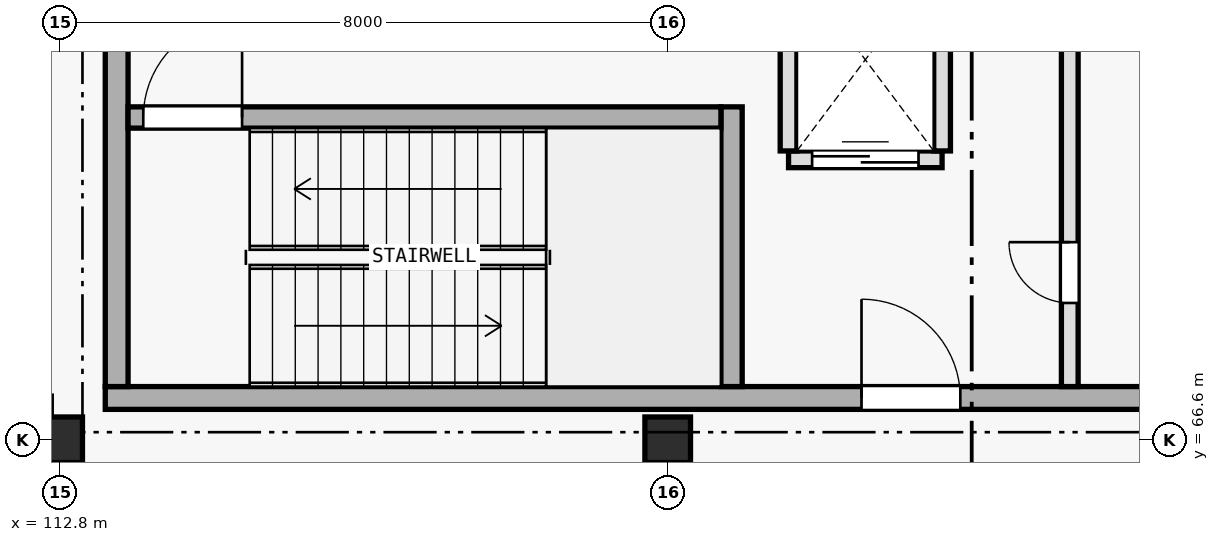
"""IFC4 building model, lengths in metres.
Left out: names, types, materials, properties, quantities, classifications, styles, units other than length and angle.
Written with IfcOpenShell. Run it as: python <this file> out.ifc"""

import sys

from ifc_helpers import new_model, si_unit, direction, frame, frame_2d, origin, origin_2d, place, context, subcontext, project, spatial, rectangle, extrude, element, fill, save


model = new_model("IFC4")
c1 = context("Model", 3, precision=1e-05, world=origin(), true_north=direction((0.0, 1.0)))
c2 = subcontext(c1, "Body", "Model", "MODEL_VIEW")
j1 = project(units=[si_unit("LENGTHUNIT", "METRE"), si_unit("PLANEANGLEUNIT", "RADIAN")], contexts=[c1])
p1 = place(None, origin())
s1 = spatial("IfcSite", under=j1, at=p1, CompositionType="ELEMENT")
p2 = place(p1, origin())
s2 = spatial("IfcBuilding", under=s1, at=p2, CompositionType="ELEMENT")
p3 = place(p2, frame((0.0, 0.0, -4.8)))
s3 = spatial("IfcBuildingStorey", under=s2, at=p3, CompositionType="ELEMENT", Elevation=-4.8)
p4 = place(p3, frame((113.4, 67.15, 0.0), z_axis=(0.0, 0.0, 1.0), x_axis=(1.0, 0.0, 0.0)))
e1 = element("IfcWall", 1, at=p4, inside=s3, PredefinedType="SHEAR", context=c2, shape_type="SweptSolid", body=[
    extrude(rectangle(XDim=14.4, YDim=0.3, at=frame_2d((7.2, 0.0))), origin(), (0.0, 0.0, 1.0), 4.795),
])
p5 = place(p4, frame((9.95, 0.0, 0.0)))
e2 = element("IfcOpeningElement", 2, at=p5, cuts=e1, PredefinedType="OPENING", context=c2, shape_type="SweptSolid", body=[
    extrude(rectangle(XDim=1.3, YDim=2.2, at=frame_2d((0.65, 1.1))), frame((0.0, 0.16, 0.0), z_axis=(0.0, -1.0, 0.0), x_axis=(1.0, 0.0, 0.0)), (0.0, 0.0, 1.0), 0.32),
])
p6 = place(p3, frame((113.55, 67.3, 0.0), z_axis=(0.0, 0.0, 1.0), x_axis=(0.0, 1.0, 0.0)))
e3 = element("IfcWall", 3, at=p6, inside=s3, PredefinedType="SHEAR", context=c2, shape_type="SweptSolid", body=[
    extrude(rectangle(XDim=5.8, YDim=0.3, at=frame_2d((2.9, 0.0))), origin(), (0.0, 0.0, 1.0), 4.795),
])
p7 = place(p3, frame((121.64, 67.3, 0.0), z_axis=(0.0, 0.0, 1.0), x_axis=(0.0, 1.0, 0.0)))
e4 = element("IfcWall", 4, at=p7, inside=s3, PredefinedType="SHEAR", context=c2, shape_type="SweptSolid", body=[
    extrude(rectangle(XDim=3.68, YDim=0.28, at=frame_2d((1.84, 0.0))), origin(), (0.0, 0.0, 1.0), 4.795),
])
p8 = place(p3, frame((113.7, 70.84, 0.0), z_axis=(0.0, 0.0, 1.0), x_axis=(1.0, 0.0, 0.0)))
e5 = element("IfcWall", 5, at=p8, inside=s3, PredefinedType="SHEAR", context=c2, shape_type="SweptSolid", body=[
    extrude(rectangle(XDim=7.8, YDim=0.28, at=frame_2d((3.9, 0.0))), origin(), (0.0, 0.0, 1.0), 4.795),
])
p9 = place(p8, frame((0.2, 0.0, 0.0)))
e6 = element("IfcOpeningElement", 6, at=p9, cuts=e5, PredefinedType="OPENING", context=c2, shape_type="SweptSolid", body=[
    extrude(rectangle(XDim=1.3, YDim=2.2, at=frame_2d((0.65, 1.1))), frame((0.0, 0.15, 0.0), z_axis=(0.0, -1.0, 0.0), x_axis=(1.0, 0.0, 0.0)), (0.0, 0.0, 1.0), 0.3),
])
for number, where, z_axis, x_axis in (
    (7, (112.8, 66.6, 0.0), (0.0, 0.0, 1.0), (1.0, 0.0, 0.0)),
    (8, (120.8, 66.6, 0.0), (0.0, 0.0, 1.0), (1.0, 0.0, 0.0)),
):
    element("IfcColumn", number, at=place(p3, frame(where, z_axis=z_axis, x_axis=x_axis)), inside=s3, PredefinedType="COLUMN", context=c2, shape_type="SweptSolid", body=[
        extrude(rectangle(XDim=0.6, YDim=0.6, at=origin_2d()), origin(), (0.0, 0.0, 1.0), 4.8),
    ])
p10 = place(p3, frame((122.39, 70.29, 0.0), z_axis=(0.0, 0.0, 1.0), x_axis=(1.0, 0.0, 0.0)))
e9 = element("IfcWall", 9, at=p10, inside=s3, PredefinedType="PLUMBINGWALL", context=c2, shape_type="SweptSolid", body=[
    extrude(rectangle(XDim=2.02, YDim=0.22, at=frame_2d((1.01, 0.0))), origin(), (0.0, 0.0, 1.0), 4.38),
])
p11 = place(p10, frame((0.31, 0.0, 0.0)))
e10 = element("IfcOpeningElement", 10, at=p11, cuts=e9, PredefinedType="OPENING", context=c2, shape_type="SweptSolid", body=[
    extrude(rectangle(XDim=1.4, YDim=2.4, at=frame_2d((0.7, 1.2))), frame((0.0, 0.12, 0.0), z_axis=(0.0, -1.0, 0.0), x_axis=(1.0, 0.0, 0.0)), (0.0, 0.0, 1.0), 0.24),
])
for number, where, z_axis, x_axis in (
    (11, (122.39, 70.4, 0.0), (0.0, 0.0, 1.0), (0.0, 1.0, 0.0)),
    (12, (124.41, 70.4, 0.0), (0.0, 0.0, 1.0), (0.0, 1.0, 0.0)),
):
    element("IfcWall", number, at=place(p3, frame(where, z_axis=z_axis, x_axis=x_axis)), inside=s3, PredefinedType="PLUMBINGWALL", context=c2, shape_type="SweptSolid", body=[
        extrude(rectangle(XDim=2.4, YDim=0.22, at=frame_2d((1.2, 0.0))), origin(), (0.0, 0.0, 1.0), 4.38),
    ])
p12 = place(p3, frame((126.09, 67.3, 0.0), z_axis=(0.0, 0.0, 1.0), x_axis=(0.0, 1.0, 0.0)))
e13 = element("IfcWall", 13, at=p12, inside=s3, PredefinedType="PLUMBINGWALL", context=c2, shape_type="SweptSolid", body=[
    extrude(rectangle(XDim=5.8, YDim=0.22, at=frame_2d((2.9, 0.0))), origin(), (0.0, 0.0, 1.0), 4.38),
])
p13 = place(p12, frame((1.1, 0.0, 0.0)))
e14 = element("IfcOpeningElement", 14, at=p13, cuts=e13, PredefinedType="OPENING", context=c2, shape_type="SweptSolid", body=[
    extrude(rectangle(XDim=0.8, YDim=2.1, at=frame_2d((0.4, 1.05))), frame((0.0, 0.12, 0.0), z_axis=(0.0, -1.0, 0.0), x_axis=(1.0, 0.0, 0.0)), (0.0, 0.0, 1.0), 0.24),
])
p14 = place(p9, origin())
e15 = element("IfcDoor", 15, at=p14, inside=s3, OperationType="SINGLE_SWING_RIGHT", PredefinedType="DOOR", context=c2, shape_type="SweptSolid", body=[
    extrude(rectangle(XDim=1.3, YDim=2.2, at=frame_2d((0.65, 1.1))), frame((0.0, 0.025, 0.0), z_axis=(0.0, -1.0, 0.0), x_axis=(1.0, 0.0, 0.0)), (0.0, 0.0, 1.0), 0.05),
])
fill(e6, e15)
p15 = place(p11, origin())
e16 = element("IfcDoor", 16, at=p15, inside=s3, OperationType="DOUBLE_DOOR_SLIDING", PredefinedType="DOOR", context=c2, shape_type="SweptSolid", body=[
    extrude(rectangle(XDim=1.4, YDim=2.4, at=frame_2d((0.7, 1.2))), frame((0.0, 0.025, 0.0), z_axis=(0.0, -1.0, 0.0), x_axis=(1.0, 0.0, 0.0)), (0.0, 0.0, 1.0), 0.05),
])
fill(e10, e16)
p16 = place(p13, origin())
e17 = element("IfcDoor", 17, at=p16, inside=s3, OperationType="SINGLE_SWING_RIGHT", PredefinedType="DOOR", context=c2, shape_type="SweptSolid", body=[
    extrude(rectangle(XDim=0.8, YDim=2.1, at=frame_2d((0.4, 1.05))), frame((0.0, 0.025, 0.0), z_axis=(0.0, -1.0, 0.0), x_axis=(1.0, 0.0, 0.0)), (0.0, 0.0, 1.0), 0.05),
])
fill(e14, e17)
p17 = place(p5, origin())
e18 = element("IfcDoor", 18, at=p17, inside=s3, OperationType="SINGLE_SWING_LEFT", PredefinedType="DOOR", context=c2, shape_type="SweptSolid", body=[
    extrude(rectangle(XDim=1.3, YDim=2.2, at=frame_2d((0.65, 1.1))), frame((0.0, 0.025, 0.0), z_axis=(0.0, -1.0, 0.0), x_axis=(1.0, 0.0, 0.0)), (0.0, 0.0, 1.0), 0.05),
])
fill(e2, e18)
save(model, sys.argv[1])
